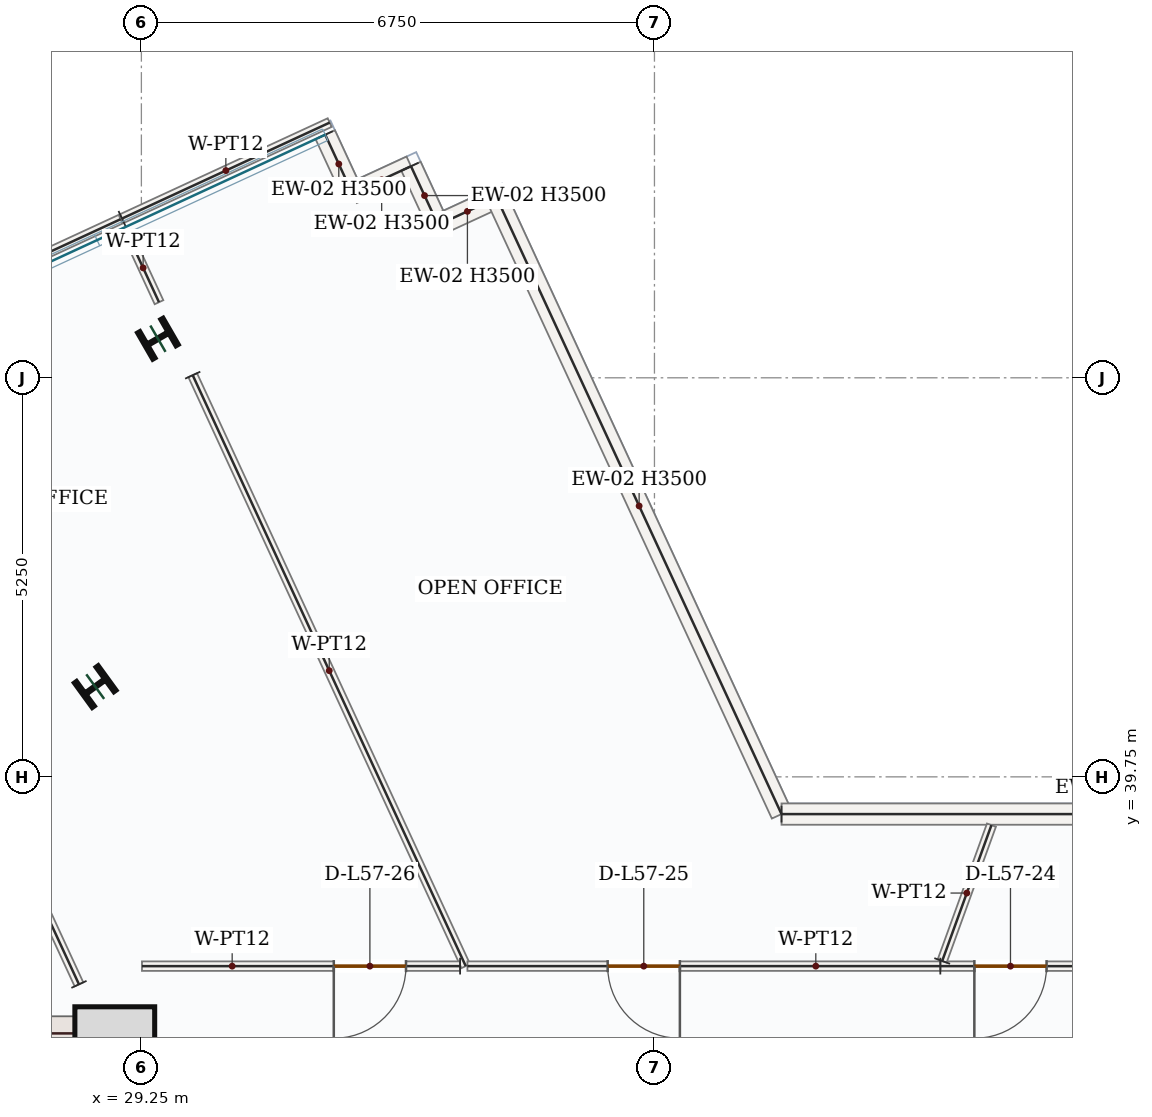
"""IFC4 building model, lengths in metres.
Left out: names, types, materials, properties, quantities, classifications, styles, units other than length and angle.
Written with IfcOpenShell. Run it as: python <this file> out.ifc"""

import sys

from ifc_helpers import new_model, si_unit, direction, frame, frame_2d, origin, origin_2d, place, context, subcontext, project, spatial, rectangle, i_section, extrude, source, transform, mapped, element, fill, save


model = new_model("IFC4")
c1 = context("Model", 3, precision=1e-05, world=origin(), true_north=direction((0.0, 1.0)))
c2 = subcontext(c1, "Body", "Model", "MODEL_VIEW")
j1 = project(units=[si_unit("LENGTHUNIT", "METRE"), si_unit("PLANEANGLEUNIT", "RADIAN")], contexts=[c1])
p1 = place(None, origin())
s1 = spatial("IfcSite", under=j1, at=p1, CompositionType="ELEMENT")
p2 = place(p1, origin())
s2 = spatial("IfcBuilding", under=s1, at=p2, CompositionType="ELEMENT")
p3 = place(p2, frame((0.0, 0.0, 242.85)))
s3 = spatial("IfcBuildingStorey", under=s2, at=p3, CompositionType="ELEMENT", Elevation=242.85)
p4 = place(p3, frame((29.025, 28.05, 0.0), z_axis=(0.0, 0.0, 1.0), x_axis=(0.0, 1.0, 0.0)))
e1 = element("IfcWall", 1, at=p4, inside=s3, PredefinedType="SHEAR", context=c2, shape_type="SweptSolid", body=[
    extrude(rectangle(XDim=8.55, YDim=0.45, at=frame_2d((4.275, 0.0))), origin(), (0.0, 0.0, 1.0), 3.5),
])
p5 = place(p4, frame((1.5, 0.0, 0.0)))
e2 = element("IfcOpeningElement", 2, at=p5, cuts=e1, PredefinedType="OPENING", context=c2, shape_type="SweptSolid", body=[
    extrude(rectangle(XDim=1.1, YDim=2.2, at=frame_2d((0.55, 1.1))), frame((0.0, 0.235, 0.0), z_axis=(0.0, -1.0, 0.0), x_axis=(1.0, 0.0, 0.0)), (0.0, 0.0, 1.0), 0.47),
])
m1 = source(origin(), c2, "Body", "SweptSolid", [
    extrude(rectangle(XDim=7.1, YDim=0.45, at=frame_2d((3.55, 0.0))), origin(), (0.0, 0.0, 1.0), 3.5),
])
p6 = place(p3, frame((21.7, 36.375, 0.0), z_axis=(0.0, 0.0, 1.0), x_axis=(1.0, 0.0, 0.0)))
e3 = element("IfcWall", 3, at=p6, inside=s3, PredefinedType="SHEAR", context=c2, shape_type="MappedRepresentation", body=[
    mapped(m1, transform((0.0, 0.0, 0.0), x_axis=(1.0, 0.0, 0.0), y_axis=(0.0, 1.0, 0.0), z_axis=(0.0, 0.0, 1.0), scale=1.0)),
])
m2 = source(origin(), c2, "Body", "SweptSolid", [
    extrude(rectangle(XDim=1.05, YDim=1.05, at=origin_2d()), origin(), (0.0, 0.0, 1.0), 3.75),
])
p7 = place(p3, frame((28.9, 36.2, 0.0), z_axis=(0.0, 0.0, 1.0), x_axis=(1.0, 0.0, 0.0)))
e4 = element("IfcColumn", 4, at=p7, inside=s3, PredefinedType="COLUMN", context=c2, shape_type="MappedRepresentation", body=[
    mapped(m2, transform((0.0, 0.0, 0.0), x_axis=(1.0, 0.0, 0.0), y_axis=(0.0, 1.0, 0.0), z_axis=(0.0, 0.0, 1.0), scale=1.0)),
])
m3 = source(origin(), c2, "Body", "SweptSolid", [
    extrude(i_section(OverallWidth=0.399, OverallDepth=0.386, WebThickness=0.021, FlangeThickness=0.033, FilletRadius=0.018, at=origin_2d()), origin(), (0.0, 0.0, 1.0), 3.75),
])
for number, where, z_axis, x_axis in (
    (5, (28.643, 40.937, 0.0), (0.0, 0.0, 1.0), (-0.588, 0.809, 0.0)),
    (6, (29.468, 45.514, 0.0), (0.0, 0.0, 1.0), (-0.5, 0.866, 0.0)),
):
    element("IfcColumn", number, at=place(p3, frame(where, z_axis=z_axis, x_axis=x_axis)), inside=s3, PredefinedType="COLUMN", context=c2, shape_type="MappedRepresentation", body=[
        mapped(m3, transform((0.0, 0.0, 0.0), x_axis=(1.0, 0.0, 0.0), y_axis=(0.0, 1.0, 0.0), z_axis=(0.0, 0.0, 1.0), scale=1.0)),
    ])
m4 = source(origin(), c2, "Body", "SweptSolid", [
    extrude(rectangle(XDim=0.85, YDim=0.28, at=frame_2d((0.425, 0.0))), origin(), (0.0, 0.0, 1.0), 3.5),
])
p8 = place(p3, frame((31.669, 48.198, 0.0), z_axis=(0.0, 0.0, 1.0), x_axis=(0.419422493365, -0.907791150023, 0.0)))
e7 = element("IfcWall", 7, at=p8, inside=s3, PredefinedType="SOLIDWALL", context=c2, shape_type="MappedRepresentation", body=[
    mapped(m4, transform((0.0, 0.0, 0.0), x_axis=(1.0, 0.0, 0.0), y_axis=(0.0, 1.0, 0.0), z_axis=(0.0, 0.0, 1.0), scale=1.0)),
])
m5 = source(origin(), c2, "Body", "SweptSolid", [
    extrude(rectangle(XDim=0.85, YDim=0.28, at=frame_2d((0.425, 0.0))), origin(), (0.0, 0.0, 1.0), 3.5),
])
p9 = place(p3, frame((32.025, 47.427, 0.0), z_axis=(0.0, 0.0, 1.0), x_axis=(0.907841666427, 0.419313139191, 0.0)))
e8 = element("IfcWall", 8, at=p9, inside=s3, PredefinedType="SOLIDWALL", context=c2, shape_type="MappedRepresentation", body=[
    mapped(m5, transform((0.0, 0.0, 0.0), x_axis=(1.0, 0.0, 0.0), y_axis=(0.0, 1.0, 0.0), z_axis=(0.0, 0.0, 1.0), scale=1.0)),
])
p10 = place(p3, frame((32.797, 47.783, 0.0), z_axis=(0.0, 0.0, 1.0), x_axis=(0.419422493365, -0.907791150023, 0.0)))
e9 = element("IfcWall", 9, at=p10, inside=s3, PredefinedType="SOLIDWALL", context=c2, shape_type="MappedRepresentation", body=[
    mapped(m4, transform((0.0, 0.0, 0.0), x_axis=(1.0, 0.0, 0.0), y_axis=(0.0, 1.0, 0.0), z_axis=(0.0, 0.0, 1.0), scale=1.0)),
])
p11 = place(p3, frame((33.154, 47.012, 0.0), z_axis=(0.0, 0.0, 1.0), x_axis=(0.907841666427, 0.419313139191, 0.0)))
e10 = element("IfcWall", 10, at=p11, inside=s3, PredefinedType="SOLIDWALL", context=c2, shape_type="MappedRepresentation", body=[
    mapped(m5, transform((0.0, 0.0, 0.0), x_axis=(1.0, 0.0, 0.0), y_axis=(0.0, 1.0, 0.0), z_axis=(0.0, 0.0, 1.0), scale=1.0)),
])
m6 = source(origin(), c2, "Body", "SweptSolid", [
    extrude(rectangle(XDim=8.932, YDim=0.28, at=frame_2d((4.466, 0.0))), origin(), (0.0, 0.0, 1.0), 3.5),
])
p12 = place(p3, frame((33.925, 47.368, 0.0), z_axis=(0.0, 0.0, 1.0), x_axis=(0.419437747849, -0.90778410191, 0.0)))
e11 = element("IfcWall", 11, at=p12, inside=s3, PredefinedType="SOLIDWALL", context=c2, shape_type="MappedRepresentation", body=[
    mapped(m6, transform((0.0, 0.0, 0.0), x_axis=(1.0, 0.0, 0.0), y_axis=(0.0, 1.0, 0.0), z_axis=(0.0, 0.0, 1.0), scale=1.0)),
])
m7 = source(origin(), c2, "Body", "SweptSolid", [
    extrude(rectangle(XDim=8.984, YDim=0.28, at=frame_2d((4.492, 0.0))), origin(), (0.0, 0.0, 1.0), 2.772),
])
p13 = place(p3, frame((37.672, 39.26, 0.0), z_axis=(0.0, 0.0, 1.0), x_axis=(1.0, 0.0, 0.0)))
e12 = element("IfcWall", 12, at=p13, inside=s3, PredefinedType="SOLIDWALL", context=c2, shape_type="MappedRepresentation", body=[
    mapped(m7, transform((0.0, 0.0, 0.0), x_axis=(1.0, 0.0, 0.0), y_axis=(0.0, 1.0, 0.0), z_axis=(0.0, 0.0, 1.0), scale=1.0)),
])
p14 = place(p3, frame((42.747, 37.259, 0.0), z_axis=(0.0, 0.0, 1.0), x_axis=(-0.999999916415, 0.000408864141, 0.0)))
e13 = element("IfcWall", 13, at=p14, inside=s3, PredefinedType="PARTITIONING", context=c2, shape_type="SweptSolid", body=[
    extrude(rectangle(XDim=2.986, YDim=0.125, at=frame_2d((1.493, 0.0))), origin(), (0.0, 0.0, 1.0), 3.5),
])
p15 = place(p14, frame((1.588, 0.0, 0.0)))
e14 = element("IfcOpeningElement", 14, at=p15, cuts=e13, PredefinedType="OPENING", context=c2, shape_type="SweptSolid", body=[
    extrude(rectangle(XDim=0.95, YDim=2.15, at=frame_2d((0.475, 1.075))), frame((0.0, 0.073, 0.0), z_axis=(0.0, -1.0, 0.0), x_axis=(1.0, 0.0, 0.0)), (0.0, 0.0, 1.0), 0.145),
])
m8 = source(origin(), c2, "Body", "SweptSolid", [
    extrude(rectangle(XDim=1.901, YDim=0.125, at=frame_2d((0.951, 0.0))), origin(), (0.0, 0.0, 1.0), 3.5),
])
p16 = place(p3, frame((39.785, 37.327, 0.0), z_axis=(0.0, 0.0, 1.0), x_axis=(0.340887270823, 0.940104179648, 0.0)))
e15 = element("IfcWall", 15, at=p16, inside=s3, PredefinedType="PARTITIONING", context=c2, shape_type="MappedRepresentation", body=[
    mapped(m8, transform((0.0, 0.0, 0.0), x_axis=(1.0, 0.0, 0.0), y_axis=(0.0, 1.0, 0.0), z_axis=(0.0, 0.0, 1.0), scale=1.0)),
])
m9 = source(origin(), c2, "Body", "SweptSolid", [
    extrude(rectangle(XDim=8.564, YDim=0.125, at=frame_2d((4.282, 0.0))), origin(), (0.0, 0.0, 1.0), 3.5),
])
p17 = place(p3, frame((29.925, 45.034, 0.0), z_axis=(0.0, 0.0, 1.0), x_axis=(0.419463084945, -0.907772394584, 0.0)))
e16 = element("IfcWall", 16, at=p17, inside=s3, PredefinedType="PARTITIONING", context=c2, shape_type="MappedRepresentation", body=[
    mapped(m9, transform((0.0, 0.0, 0.0), x_axis=(1.0, 0.0, 0.0), y_axis=(0.0, 1.0, 0.0), z_axis=(0.0, 0.0, 1.0), scale=1.0)),
])
p18 = place(p3, frame((33.443, 37.26, 0.0), z_axis=(0.0, 0.0, 1.0), x_axis=(-0.999999998299, -5.8329445e-05, 0.0)))
e17 = element("IfcWall", 17, at=p18, inside=s3, PredefinedType="PARTITIONING", context=c2, shape_type="SweptSolid", body=[
    extrude(rectangle(XDim=4.186, YDim=0.125, at=frame_2d((2.093, 0.0))), origin(), (0.0, 0.0, 1.0), 3.5),
])
p19 = place(p18, frame((0.712, 0.0, 0.0)))
e18 = element("IfcOpeningElement", 18, at=p19, cuts=e17, PredefinedType="OPENING", context=c2, shape_type="SweptSolid", body=[
    extrude(rectangle(XDim=0.95, YDim=2.15, at=frame_2d((0.475, 1.075))), frame((0.0, 0.073, 0.0), z_axis=(0.0, -1.0, 0.0), x_axis=(1.0, 0.0, 0.0)), (0.0, 0.0, 1.0), 0.145),
])
m10 = source(origin(), c2, "Body", "SweptSolid", [
    extrude(rectangle(XDim=8.701, YDim=0.125, at=frame_2d((4.351, 0.0))), origin(), (0.0, 0.0, 1.0), 3.5),
])
p20 = place(p3, frame((28.429, 37.02, 0.0), z_axis=(0.0, 0.0, 1.0), x_axis=(-0.419458495046, 0.907774515468, 0.0)))
e19 = element("IfcWall", 19, at=p20, inside=s3, PredefinedType="PARTITIONING", context=c2, shape_type="MappedRepresentation", body=[
    mapped(m10, transform((0.0, 0.0, 0.0), x_axis=(1.0, 0.0, 0.0), y_axis=(0.0, 1.0, 0.0), z_axis=(0.0, 0.0, 1.0), scale=1.0)),
])
m11 = source(origin(), c2, "Body", "SweptSolid", [
    extrude(rectangle(XDim=4.72, YDim=0.125, at=frame_2d((2.36, 0.0))), origin(), (0.0, 0.0, 1.0), 3.5),
])
p21 = place(p3, frame((24.692, 45.107, 0.0), z_axis=(0.0, 0.0, 1.0), x_axis=(0.907753377062, 0.419504238873, 0.0)))
e20 = element("IfcWall", 20, at=p21, inside=s3, PredefinedType="PARTITIONING", context=c2, shape_type="MappedRepresentation", body=[
    mapped(m11, transform((0.0, 0.0, 0.0), x_axis=(1.0, 0.0, 0.0), y_axis=(0.0, 1.0, 0.0), z_axis=(0.0, 0.0, 1.0), scale=1.0)),
])
m12 = source(origin(), c2, "Body", "SweptSolid", [
    extrude(rectangle(XDim=0.996, YDim=0.125, at=frame_2d((0.498, 0.0))), origin(), (0.0, 0.0, 1.0), 3.5),
])
p22 = place(p3, frame((29.064, 46.898, 0.0), z_axis=(0.0, 0.0, 1.0), x_axis=(0.419540149112, -0.907736780836, 0.0)))
e21 = element("IfcWall", 21, at=p22, inside=s3, PredefinedType="PARTITIONING", context=c2, shape_type="MappedRepresentation", body=[
    mapped(m12, transform((0.0, 0.0, 0.0), x_axis=(1.0, 0.0, 0.0), y_axis=(0.0, 1.0, 0.0), z_axis=(0.0, 0.0, 1.0), scale=1.0)),
])
m13 = source(origin(), c2, "Body", "SweptSolid", [
    extrude(rectangle(XDim=3.01, YDim=0.125, at=frame_2d((1.505, 0.0))), origin(), (0.0, 0.0, 1.0), 3.5),
])
p23 = place(p3, frame((28.995, 47.095, 0.0), z_axis=(0.0, 0.0, 1.0), x_axis=(0.907790759102, 0.419423339467, 0.0)))
e22 = element("IfcWall", 22, at=p23, inside=s3, PredefinedType="PARTITIONING", context=c2, shape_type="MappedRepresentation", body=[
    mapped(m13, transform((0.0, 0.0, 0.0), x_axis=(1.0, 0.0, 0.0), y_axis=(0.0, 1.0, 0.0), z_axis=(0.0, 0.0, 1.0), scale=1.0)),
])
p24 = place(p3, frame((39.761, 37.26, 0.0), z_axis=(0.0, 0.0, 1.0), x_axis=(-1.0, 0.0, 0.0)))
e23 = element("IfcWall", 23, at=p24, inside=s3, PredefinedType="PARTITIONING", context=c2, shape_type="SweptSolid", body=[
    extrude(rectangle(XDim=6.221, YDim=0.125, at=frame_2d((3.111, 0.0))), origin(), (0.0, 0.0, 1.0), 3.5),
])
p25 = place(p24, frame((3.427, 0.0, 0.0)))
e24 = element("IfcOpeningElement", 24, at=p25, cuts=e23, PredefinedType="OPENING", context=c2, shape_type="SweptSolid", body=[
    extrude(rectangle(XDim=0.95, YDim=2.15, at=frame_2d((0.475, 1.075))), frame((0.0, 0.073, 0.0), z_axis=(0.0, -1.0, 0.0), x_axis=(1.0, 0.0, 0.0)), (0.0, 0.0, 1.0), 0.145),
])
m14 = source(origin(), c2, "Body", "SweptSolid", [
    extrude(rectangle(XDim=0.95, YDim=2.15, at=frame_2d((0.475, 1.075))), frame((0.0, 0.025, 0.0), z_axis=(0.0, -1.0, 0.0), x_axis=(1.0, 0.0, 0.0)), (0.0, 0.0, 1.0), 0.05),
])
p26 = place(p15, origin())
e25 = element("IfcDoor", 25, at=p26, inside=s3, OperationType="SINGLE_SWING_RIGHT", PredefinedType="DOOR", context=c2, shape_type="MappedRepresentation", body=[
    mapped(m14, transform((0.0, 0.0, 0.0), x_axis=(1.0, 0.0, 0.0), y_axis=(0.0, 1.0, 0.0), z_axis=(0.0, 0.0, 1.0), scale=1.0)),
])
fill(e14, e25)
p27 = place(p25, origin())
e26 = element("IfcDoor", 26, at=p27, inside=s3, OperationType="SINGLE_SWING_LEFT", PredefinedType="DOOR", context=c2, shape_type="MappedRepresentation", body=[
    mapped(m14, transform((0.0, 0.0, 0.0), x_axis=(1.0, 0.0, 0.0), y_axis=(0.0, 1.0, 0.0), z_axis=(0.0, 0.0, 1.0), scale=1.0)),
])
fill(e24, e26)
p28 = place(p19, origin())
e27 = element("IfcDoor", 27, at=p28, inside=s3, OperationType="SINGLE_SWING_RIGHT", PredefinedType="DOOR", context=c2, shape_type="MappedRepresentation", body=[
    mapped(m14, transform((0.0, 0.0, 0.0), x_axis=(1.0, 0.0, 0.0), y_axis=(0.0, 1.0, 0.0), z_axis=(0.0, 0.0, 1.0), scale=1.0)),
])
fill(e18, e27)
save(model, sys.argv[1])
